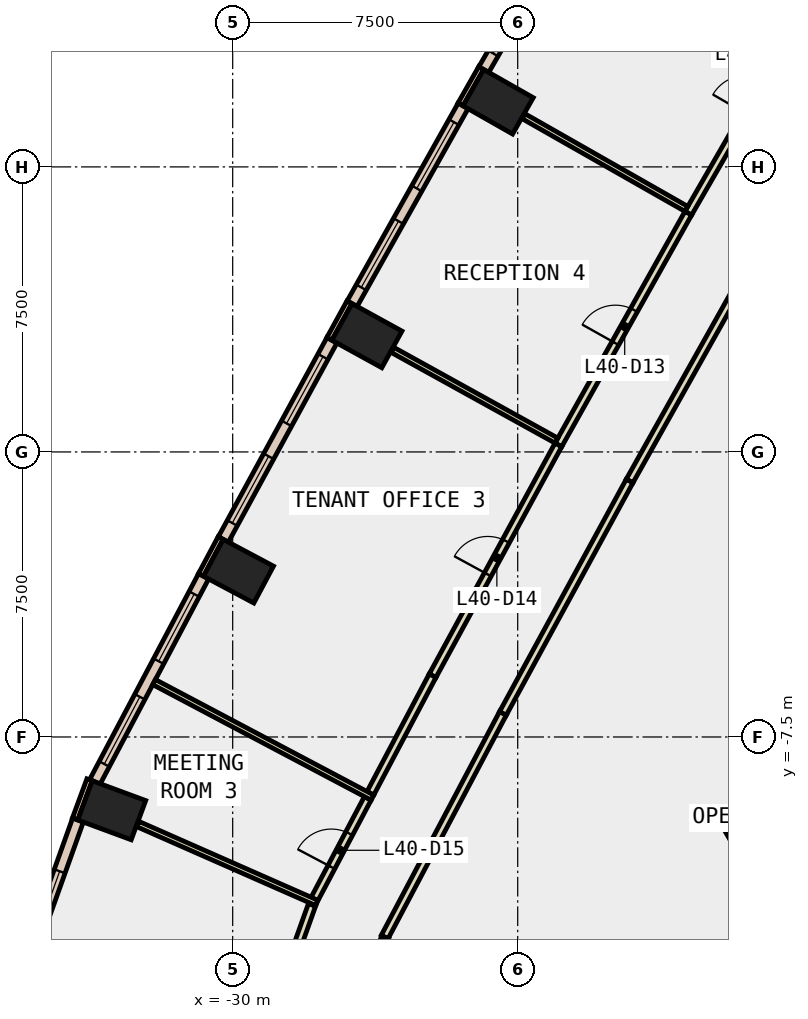
"""IFC4 building model, lengths in metres.
Left out: names, types, materials, properties, quantities, classifications, styles, units other than length and angle.
Written with IfcOpenShell. Run it as: python <this file> out.ifc"""

import sys

from ifc_helpers import new_model, si_unit, direction, frame, frame_2d, origin, origin_2d, place, context, subcontext, project, spatial, rectangle, extrude, element, fill, save


model = new_model("IFC4")
c1 = context("Model", 3, precision=1e-05, world=origin(), true_north=direction((0.0, 1.0)))
c2 = subcontext(c1, "Body", "Model", "MODEL_VIEW")
j1 = project(units=[si_unit("LENGTHUNIT", "METRE"), si_unit("PLANEANGLEUNIT", "RADIAN")], contexts=[c1])
p1 = place(None, origin())
s1 = spatial("IfcSite", under=j1, at=p1, CompositionType="ELEMENT")
p2 = place(p1, origin())
s2 = spatial("IfcBuilding", under=s1, at=p2, CompositionType="ELEMENT")
p3 = place(p2, frame((0.0, 0.0, 180.2)))
s3 = spatial("IfcBuildingStorey", under=s2, at=p3, CompositionType="ELEMENT", Elevation=180.2)
for number, where, z_axis, x_axis in (
    (1, (-23.015, 9.214, -0.4), (0.0, 0.0, 1.0), (0.494, 0.869, 0.0)),
    (2, (-26.468, 3.059, -0.4), (0.0, 0.0, 1.0), (0.482, 0.876, 0.0)),
    (3, (-29.847, -3.138, -0.4), (0.0, 0.0, 1.0), (0.47, 0.883, 0.0)),
    (4, (-33.183, -9.429, -0.4), (0.0, 0.0, 1.0), (0.347, 0.938, 0.0)),
):
    element("IfcColumn", number, at=place(p3, frame(where, z_axis=z_axis, x_axis=x_axis)), inside=s3, PredefinedType="COLUMN", context=c2, shape_type="SweptSolid", body=[
        extrude(rectangle(XDim=1.1, YDim=1.5, at=origin_2d()), origin(), (0.0, 0.0, 1.0), 4.0),
    ])
p4 = place(p3, frame((-9.31, -5.375, -0.4), z_axis=(0.0, 0.0, 1.0), x_axis=(-0.866017533419, -0.500013631625, 0.0)))
e5 = element("IfcWall", 5, at=p4, inside=s3, PredefinedType="SHEAR", context=c2, shape_type="SweptSolid", body=[
    extrude(rectangle(XDim=9.0, YDim=0.8, at=frame_2d((4.5, 0.0))), origin(), (0.0, 0.0, 1.0), 4.0),
])
p5 = place(p3, frame((-23.461, 10.1, 0.0), z_axis=(0.0, 0.0, 1.0), x_axis=(-0.494512685492, -0.869170411305, 0.0)))
e6 = element("IfcWall", 6, at=p5, inside=s3, PredefinedType="STANDARD", context=c2, shape_type="SweptSolid", body=[
    extrude(rectangle(XDim=1.1, YDim=0.15, at=frame_2d((0.55, 0.0))), origin(), (0.0, 0.0, 1.0), 3.6),
])
p6 = place(p3, frame((-26.926, 3.939, 0.0), z_axis=(0.0, 0.0, 1.0), x_axis=(-0.481850587491, -0.876253394478, 0.0)))
e7 = element("IfcWall", 7, at=p6, inside=s3, PredefinedType="STANDARD", context=c2, shape_type="SweptSolid", body=[
    extrude(rectangle(XDim=1.1, YDim=0.15, at=frame_2d((0.55, 0.0))), origin(), (0.0, 0.0, 1.0), 3.6),
])
p7 = place(p3, frame((-30.316, -2.265, 0.0), z_axis=(0.0, 0.0, 1.0), x_axis=(-0.469966207956, -0.882684407577, 0.0)))
e8 = element("IfcWall", 8, at=p7, inside=s3, PredefinedType="STANDARD", context=c2, shape_type="SweptSolid", body=[
    extrude(rectangle(XDim=1.1, YDim=0.15, at=frame_2d((0.55, 0.0))), origin(), (0.0, 0.0, 1.0), 3.6),
])
p8 = place(p3, frame((-33.766, -8.627, 0.0), z_axis=(0.0, 0.0, 1.0), x_axis=(-0.346229846278, -0.938149718087, 0.0)))
e9 = element("IfcWall", 9, at=p8, inside=s3, PredefinedType="STANDARD", context=c2, shape_type="SweptSolid", body=[
    extrude(rectangle(XDim=1.1, YDim=0.15, at=frame_2d((0.55, 0.0))), origin(), (0.0, 0.0, 1.0), 3.6),
])
p9 = place(p3, frame((-20.409, 15.23, 0.0), z_axis=(0.0, 0.0, 1.0), x_axis=(-0.499908916093, -0.866077984716, 0.0)))
e10 = element("IfcWall", 10, at=p9, inside=s3, PredefinedType="STANDARD", context=c2, shape_type="SweptSolid", body=[
    extrude(rectangle(XDim=5.969, YDim=0.3, at=frame_2d((2.985, 0.0))), origin(), (0.0, 0.0, 1.0), 3.6),
])
p10 = place(p9, frame((0.492, 0.0, 0.9)))
e11 = element("IfcOpeningElement", 11, at=p10, cuts=e10, PredefinedType="OPENING", context=c2, shape_type="SweptSolid", body=[
    extrude(rectangle(XDim=2.0, YDim=2.6, at=frame_2d((1.0, 1.3))), frame((0.0, 0.16, 0.0), z_axis=(0.0, -1.0, 0.0), x_axis=(1.0, 0.0, 0.0)), (0.0, 0.0, 1.0), 0.32),
])
p11 = place(p9, frame((3.477, 0.0, 0.9)))
e12 = element("IfcOpeningElement", 12, at=p11, cuts=e10, PredefinedType="OPENING", context=c2, shape_type="SweptSolid", body=[
    extrude(rectangle(XDim=2.0, YDim=2.6, at=frame_2d((1.0, 1.3))), frame((0.0, 0.16, 0.0), z_axis=(0.0, -1.0, 0.0), x_axis=(1.0, 0.0, 0.0)), (0.0, 0.0, 1.0), 0.32),
])
p12 = place(p3, frame((-23.936, 9.106, 0.0), z_axis=(0.0, 0.0, 1.0), x_axis=(-0.489305602904, -0.872112393541, 0.0)))
e13 = element("IfcWall", 13, at=p12, inside=s3, PredefinedType="STANDARD", context=c2, shape_type="SweptSolid", body=[
    extrude(rectangle(XDim=5.969, YDim=0.3, at=frame_2d((2.985, 0.0))), origin(), (0.0, 0.0, 1.0), 3.6),
])
p13 = place(p12, frame((0.492, 0.0, 0.9)))
e14 = element("IfcOpeningElement", 14, at=p13, cuts=e13, PredefinedType="OPENING", context=c2, shape_type="SweptSolid", body=[
    extrude(rectangle(XDim=2.0, YDim=2.6, at=frame_2d((1.0, 1.3))), frame((0.0, 0.16, 0.0), z_axis=(0.0, -1.0, 0.0), x_axis=(1.0, 0.0, 0.0)), (0.0, 0.0, 1.0), 0.32),
])
p14 = place(p12, frame((3.477, 0.0, 0.9)))
e15 = element("IfcOpeningElement", 15, at=p14, cuts=e13, PredefinedType="OPENING", context=c2, shape_type="SweptSolid", body=[
    extrude(rectangle(XDim=2.0, YDim=2.6, at=frame_2d((1.0, 1.3))), frame((0.0, 0.16, 0.0), z_axis=(0.0, -1.0, 0.0), x_axis=(1.0, 0.0, 0.0)), (0.0, 0.0, 1.0), 0.32),
])
p15 = place(p3, frame((-27.388, 2.939, 0.0), z_axis=(0.0, 0.0, 1.0), x_axis=(-0.478711740571, -0.877972134774, 0.0)))
e16 = element("IfcWall", 16, at=p15, inside=s3, PredefinedType="STANDARD", context=c2, shape_type="SweptSolid", body=[
    extrude(rectangle(XDim=5.97, YDim=0.3, at=frame_2d((2.985, 0.0))), origin(), (0.0, 0.0, 1.0), 3.6),
])
p16 = place(p15, frame((0.493, 0.0, 0.9)))
e17 = element("IfcOpeningElement", 17, at=p16, cuts=e16, PredefinedType="OPENING", context=c2, shape_type="SweptSolid", body=[
    extrude(rectangle(XDim=2.0, YDim=2.6, at=frame_2d((1.0, 1.3))), frame((0.0, 0.16, 0.0), z_axis=(0.0, -1.0, 0.0), x_axis=(1.0, 0.0, 0.0)), (0.0, 0.0, 1.0), 0.32),
])
p17 = place(p15, frame((3.478, 0.0, 0.9)))
e18 = element("IfcOpeningElement", 18, at=p17, cuts=e16, PredefinedType="OPENING", context=c2, shape_type="SweptSolid", body=[
    extrude(rectangle(XDim=2.0, YDim=2.6, at=frame_2d((1.0, 1.3))), frame((0.0, 0.16, 0.0), z_axis=(0.0, -1.0, 0.0), x_axis=(1.0, 0.0, 0.0)), (0.0, 0.0, 1.0), 0.32),
])
p18 = place(p3, frame((-30.765, -3.271, 0.0), z_axis=(0.0, 0.0, 1.0), x_axis=(-0.467572383403, -0.883954787463, 0.0)))
e19 = element("IfcWall", 19, at=p18, inside=s3, PredefinedType="STANDARD", context=c2, shape_type="SweptSolid", body=[
    extrude(rectangle(XDim=6.119, YDim=0.3, at=frame_2d((3.06, 0.0))), origin(), (0.0, 0.0, 1.0), 3.6),
])
p19 = place(p18, frame((0.53, 0.0, 0.9)))
e20 = element("IfcOpeningElement", 20, at=p19, cuts=e19, PredefinedType="OPENING", context=c2, shape_type="SweptSolid", body=[
    extrude(rectangle(XDim=2.0, YDim=2.6, at=frame_2d((1.0, 1.3))), frame((0.0, 0.16, 0.0), z_axis=(0.0, -1.0, 0.0), x_axis=(1.0, 0.0, 0.0)), (0.0, 0.0, 1.0), 0.32),
])
p20 = place(p18, frame((3.589, 0.0, 0.9)))
e21 = element("IfcOpeningElement", 21, at=p20, cuts=e19, PredefinedType="OPENING", context=c2, shape_type="SweptSolid", body=[
    extrude(rectangle(XDim=2.0, YDim=2.6, at=frame_2d((1.0, 1.3))), frame((0.0, 0.16, 0.0), z_axis=(0.0, -1.0, 0.0), x_axis=(1.0, 0.0, 0.0)), (0.0, 0.0, 1.0), 0.32),
])
p21 = place(p3, frame((-34.071, -9.686, 0.0), z_axis=(0.0, 0.0, 1.0), x_axis=(-0.336652028742, -0.941629126325, 0.0)))
e22 = element("IfcWall", 22, at=p21, inside=s3, PredefinedType="STANDARD", context=c2, shape_type="SweptSolid", body=[
    extrude(rectangle(XDim=4.263, YDim=0.3, at=frame_2d((2.131, 0.0))), origin(), (0.0, 0.0, 1.0), 3.6),
])
p22 = place(p21, frame((1.431, 0.0, 0.9)))
e23 = element("IfcOpeningElement", 23, at=p22, cuts=e22, PredefinedType="OPENING", context=c2, shape_type="SweptSolid", body=[
    extrude(rectangle(XDim=1.4, YDim=2.6, at=frame_2d((0.7, 1.3))), frame((0.0, 0.16, 0.0), z_axis=(0.0, -1.0, 0.0), x_axis=(1.0, 0.0, 0.0)), (0.0, 0.0, 1.0), 0.32),
])
p23 = place(p3, frame((-22.888, -6.878, 0.0), z_axis=(0.0, 0.0, 1.0), x_axis=(-0.467533790284, -0.883975200411, 0.0)))
e24 = element("IfcWall", 24, at=p23, inside=s3, PredefinedType="PARTITIONING", context=c2, shape_type="SweptSolid", body=[
    extrude(rectangle(XDim=6.656, YDim=0.2, at=frame_2d((3.328, 0.0))), origin(), (0.0, 0.0, 1.0), 3.6),
])
p24 = place(p3, frame((-25.987, -12.768, 0.0), z_axis=(0.0, 0.0, 1.0), x_axis=(-0.33645112914, -0.941700927949, 0.0)))
e25 = element("IfcWall", 25, at=p24, inside=s3, PredefinedType="PARTITIONING", context=c2, shape_type="SweptSolid", body=[
    extrude(rectangle(XDim=2.292, YDim=0.2, at=frame_2d((1.146, 0.0))), origin(), (0.0, 0.0, 1.0), 3.6),
])
p25 = place(p3, frame((-16.299, 5.04, 0.0), z_axis=(0.0, 0.0, 1.0), x_axis=(-0.489219677344, -0.872160597195, 0.0)))
e26 = element("IfcWall", 26, at=p25, inside=s3, PredefinedType="PARTITIONING", context=c2, shape_type="SweptSolid", body=[
    extrude(rectangle(XDim=6.657, YDim=0.2, at=frame_2d((3.329, 0.0))), origin(), (0.0, 0.0, 1.0), 3.6),
])
p26 = place(p3, frame((-19.556, -0.766, 0.0), z_axis=(0.0, 0.0, 1.0), x_axis=(-0.478665365973, -0.877997418799, 0.0)))
e27 = element("IfcWall", 27, at=p26, inside=s3, PredefinedType="PARTITIONING", context=c2, shape_type="SweptSolid", body=[
    extrude(rectangle(XDim=6.961, YDim=0.2, at=frame_2d((3.48, 0.0))), origin(), (0.0, 0.0, 1.0), 3.6),
])
p27 = place(p3, frame((-18.012, 6.28, 0.0), z_axis=(0.0, 0.0, 1.0), x_axis=(0.49995092924, 0.866053732947, 0.0)))
e28 = element("IfcWall", 28, at=p27, inside=s3, PredefinedType="PARTITIONING", context=c2, shape_type="SweptSolid", body=[
    extrude(rectangle(XDim=7.061, YDim=0.2, at=frame_2d((3.53, 0.0))), origin(), (0.0, 0.0, 1.0), 3.6),
])
p28 = place(p27, frame((3.03, 0.0, 0.0)))
e29 = element("IfcOpeningElement", 29, at=p28, cuts=e28, PredefinedType="OPENING", context=c2, shape_type="SweptSolid", body=[
    extrude(rectangle(XDim=1.0, YDim=2.1, at=frame_2d((0.5, 1.05))), frame((0.0, 0.11, 0.0), z_axis=(0.0, -1.0, 0.0), x_axis=(1.0, 0.0, 0.0)), (0.0, 0.0, 1.0), 0.22),
])
p29 = place(p3, frame((-21.43, 0.185, 0.0), z_axis=(0.0, 0.0, 1.0), x_axis=(0.489124577711, 0.872213934468, 0.0)))
e30 = element("IfcWall", 30, at=p29, inside=s3, PredefinedType="PARTITIONING", context=c2, shape_type="SweptSolid", body=[
    extrude(rectangle(XDim=6.988, YDim=0.2, at=frame_2d((3.494, 0.0))), origin(), (0.0, 0.0, 1.0), 3.6),
])
p30 = place(p29, frame((3.069, 0.0, 0.0)))
e31 = element("IfcOpeningElement", 31, at=p30, cuts=e30, PredefinedType="OPENING", context=c2, shape_type="SweptSolid", body=[
    extrude(rectangle(XDim=1.0, YDim=2.1, at=frame_2d((0.5, 1.05))), frame((0.0, 0.11, 0.0), z_axis=(0.0, -1.0, 0.0), x_axis=(1.0, 0.0, 0.0)), (0.0, 0.0, 1.0), 0.22),
])
p31 = place(p3, frame((-26.376, -8.982, 0.0), z_axis=(0.0, 0.0, 1.0), x_axis=(0.467529077139, 0.883977693174, 0.0)))
e32 = element("IfcWall", 32, at=p31, inside=s3, PredefinedType="PARTITIONING", context=c2, shape_type="SweptSolid", body=[
    extrude(rectangle(XDim=3.503, YDim=0.2, at=frame_2d((1.752, 0.0))), origin(), (0.0, 0.0, 1.0), 3.6),
])
p32 = place(p3, frame((-24.738, -5.885, 0.0), z_axis=(0.0, 0.0, 1.0), x_axis=(0.478535377863, 0.878068273048, 0.0)))
e33 = element("IfcWall", 33, at=p32, inside=s3, PredefinedType="PARTITIONING", context=c2, shape_type="SweptSolid", body=[
    extrude(rectangle(XDim=6.913, YDim=0.2, at=frame_2d((3.457, 0.0))), origin(), (0.0, 0.0, 1.0), 3.6),
])
p33 = place(p32, frame((3.031, 0.0, 0.0)))
e34 = element("IfcOpeningElement", 34, at=p33, cuts=e33, PredefinedType="OPENING", context=c2, shape_type="SweptSolid", body=[
    extrude(rectangle(XDim=1.0, YDim=2.1, at=frame_2d((0.5, 1.05))), frame((0.0, 0.11, 0.0), z_axis=(0.0, -1.0, 0.0), x_axis=(1.0, 0.0, 0.0)), (0.0, 0.0, 1.0), 0.22),
])
p34 = place(p3, frame((-27.891, -11.847, 0.0), z_axis=(0.0, 0.0, 1.0), x_axis=(0.467571923705, 0.883955030623, 0.0)))
e35 = element("IfcWall", 35, at=p34, inside=s3, PredefinedType="PARTITIONING", context=c2, shape_type="SweptSolid", body=[
    extrude(rectangle(XDim=3.091, YDim=0.2, at=frame_2d((1.545, 0.0))), origin(), (0.0, 0.0, 1.0), 3.6),
])
p35 = place(p34, frame((1.045, 0.0, 0.0)))
e36 = element("IfcOpeningElement", 36, at=p35, cuts=e35, PredefinedType="OPENING", context=c2, shape_type="SweptSolid", body=[
    extrude(rectangle(XDim=1.0, YDim=2.1, at=frame_2d((0.5, 1.05))), frame((0.0, 0.11, 0.0), z_axis=(0.0, -1.0, 0.0), x_axis=(1.0, 0.0, 0.0)), (0.0, 0.0, 1.0), 0.22),
])
p36 = place(p3, frame((-28.94, -14.789, 0.0), z_axis=(0.0, 0.0, 1.0), x_axis=(0.336864004528, 0.941553313654, 0.0)))
e37 = element("IfcWall", 37, at=p36, inside=s3, PredefinedType="PARTITIONING", context=c2, shape_type="SweptSolid", body=[
    extrude(rectangle(XDim=3.048, YDim=0.2, at=frame_2d((1.524, 0.0))), origin(), (0.0, 0.0, 1.0), 3.6),
])
p37 = place(p3, frame((-18.062, 6.395, 0.0), z_axis=(0.0, 0.0, 1.0), x_axis=(-0.869113540562, 0.494612629854, 0.0)))
e38 = element("IfcWall", 38, at=p37, inside=s3, PredefinedType="PARTITIONING", context=c2, shape_type="SweptSolid", body=[
    extrude(rectangle(XDim=4.929, YDim=0.15, at=frame_2d((2.465, 0.0))), origin(), (0.0, 0.0, 1.0), 3.6),
])
p38 = place(p3, frame((-21.481, 0.299, 0.0), z_axis=(0.0, 0.0, 1.0), x_axis=(-0.875073760972, 0.483989579286, 0.0)))
e39 = element("IfcWall", 39, at=p38, inside=s3, PredefinedType="PARTITIONING", context=c2, shape_type="SweptSolid", body=[
    extrude(rectangle(XDim=4.93, YDim=0.15, at=frame_2d((2.465, 0.0))), origin(), (0.0, 0.0, 1.0), 3.6),
])
p39 = place(p3, frame((-26.323, -9.095, 0.0), z_axis=(0.0, 0.0, 1.0), x_axis=(-0.883977869384, 0.467528743971, 0.0)))
e40 = element("IfcWall", 40, at=p39, inside=s3, PredefinedType="PARTITIONING", context=c2, shape_type="SweptSolid", body=[
    extrude(rectangle(XDim=6.5, YDim=0.15, at=frame_2d((3.25, 0.0))), origin(), (0.0, 0.0, 1.0), 3.6),
])
p40 = place(p3, frame((-27.788, -11.865, 0.0), z_axis=(0.0, 0.0, 1.0), x_axis=(-0.915139307711, 0.403137752489, 0.0)))
e41 = element("IfcWall", 41, at=p40, inside=s3, PredefinedType="PARTITIONING", context=c2, shape_type="SweptSolid", body=[
    extrude(rectangle(XDim=5.145, YDim=0.15, at=frame_2d((2.572, 0.0))), origin(), (0.0, 0.0, 1.0), 3.6),
])
p41 = place(p11, origin())
e42 = element("IfcWindow", 42, at=p41, inside=s3, PartitioningType="SINGLE_PANEL", PredefinedType="WINDOW", context=c2, shape_type="SweptSolid", body=[
    extrude(rectangle(XDim=2.0, YDim=2.6, at=frame_2d((1.0, 1.3))), frame((0.0, 0.03, 0.0), z_axis=(0.0, -1.0, 0.0), x_axis=(1.0, 0.0, 0.0)), (0.0, 0.0, 1.0), 0.06),
])
fill(e12, e42)
p42 = place(p13, origin())
e43 = element("IfcWindow", 43, at=p42, inside=s3, PartitioningType="SINGLE_PANEL", PredefinedType="WINDOW", context=c2, shape_type="SweptSolid", body=[
    extrude(rectangle(XDim=2.0, YDim=2.6, at=frame_2d((1.0, 1.3))), frame((0.0, 0.03, 0.0), z_axis=(0.0, -1.0, 0.0), x_axis=(1.0, 0.0, 0.0)), (0.0, 0.0, 1.0), 0.06),
])
fill(e14, e43)
p43 = place(p14, origin())
e44 = element("IfcWindow", 44, at=p43, inside=s3, PartitioningType="SINGLE_PANEL", PredefinedType="WINDOW", context=c2, shape_type="SweptSolid", body=[
    extrude(rectangle(XDim=2.0, YDim=2.6, at=frame_2d((1.0, 1.3))), frame((0.0, 0.03, 0.0), z_axis=(0.0, -1.0, 0.0), x_axis=(1.0, 0.0, 0.0)), (0.0, 0.0, 1.0), 0.06),
])
fill(e15, e44)
p44 = place(p16, origin())
e45 = element("IfcWindow", 45, at=p44, inside=s3, PartitioningType="SINGLE_PANEL", PredefinedType="WINDOW", context=c2, shape_type="SweptSolid", body=[
    extrude(rectangle(XDim=2.0, YDim=2.6, at=frame_2d((1.0, 1.3))), frame((0.0, 0.03, 0.0), z_axis=(0.0, -1.0, 0.0), x_axis=(1.0, 0.0, 0.0)), (0.0, 0.0, 1.0), 0.06),
])
fill(e17, e45)
p45 = place(p17, origin())
e46 = element("IfcWindow", 46, at=p45, inside=s3, PartitioningType="SINGLE_PANEL", PredefinedType="WINDOW", context=c2, shape_type="SweptSolid", body=[
    extrude(rectangle(XDim=2.0, YDim=2.6, at=frame_2d((1.0, 1.3))), frame((0.0, 0.03, 0.0), z_axis=(0.0, -1.0, 0.0), x_axis=(1.0, 0.0, 0.0)), (0.0, 0.0, 1.0), 0.06),
])
fill(e18, e46)
p46 = place(p19, origin())
e47 = element("IfcWindow", 47, at=p46, inside=s3, PartitioningType="SINGLE_PANEL", PredefinedType="WINDOW", context=c2, shape_type="SweptSolid", body=[
    extrude(rectangle(XDim=2.0, YDim=2.6, at=frame_2d((1.0, 1.3))), frame((0.0, 0.03, 0.0), z_axis=(0.0, -1.0, 0.0), x_axis=(1.0, 0.0, 0.0)), (0.0, 0.0, 1.0), 0.06),
])
fill(e20, e47)
p47 = place(p20, origin())
e48 = element("IfcWindow", 48, at=p47, inside=s3, PartitioningType="SINGLE_PANEL", PredefinedType="WINDOW", context=c2, shape_type="SweptSolid", body=[
    extrude(rectangle(XDim=2.0, YDim=2.6, at=frame_2d((1.0, 1.3))), frame((0.0, 0.03, 0.0), z_axis=(0.0, -1.0, 0.0), x_axis=(1.0, 0.0, 0.0)), (0.0, 0.0, 1.0), 0.06),
])
fill(e21, e48)
p48 = place(p22, origin())
e49 = element("IfcWindow", 49, at=p48, inside=s3, PartitioningType="SINGLE_PANEL", PredefinedType="WINDOW", context=c2, shape_type="SweptSolid", body=[
    extrude(rectangle(XDim=1.4, YDim=2.6, at=frame_2d((0.7, 1.3))), frame((0.0, 0.03, 0.0), z_axis=(0.0, -1.0, 0.0), x_axis=(1.0, 0.0, 0.0)), (0.0, 0.0, 1.0), 0.06),
])
fill(e23, e49)
p49 = place(p30, origin())
e50 = element("IfcDoor", 50, at=p49, inside=s3, OperationType="SINGLE_SWING_LEFT", PredefinedType="DOOR", context=c2, shape_type="SweptSolid", body=[
    extrude(rectangle(XDim=1.0, YDim=2.1, at=frame_2d((0.5, 1.05))), frame((0.0, 0.025, 0.0), z_axis=(0.0, -1.0, 0.0), x_axis=(1.0, 0.0, 0.0)), (0.0, 0.0, 1.0), 0.05),
])
fill(e31, e50)
p50 = place(p33, origin())
e51 = element("IfcDoor", 51, at=p50, inside=s3, OperationType="SINGLE_SWING_RIGHT", PredefinedType="DOOR", context=c2, shape_type="SweptSolid", body=[
    extrude(rectangle(XDim=1.0, YDim=2.1, at=frame_2d((0.5, 1.05))), frame((0.0, 0.025, 0.0), z_axis=(0.0, -1.0, 0.0), x_axis=(1.0, 0.0, 0.0)), (0.0, 0.0, 1.0), 0.05),
])
fill(e34, e51)
p51 = place(p35, origin())
e52 = element("IfcDoor", 52, at=p51, inside=s3, OperationType="SINGLE_SWING_LEFT", PredefinedType="DOOR", context=c2, shape_type="SweptSolid", body=[
    extrude(rectangle(XDim=1.0, YDim=2.1, at=frame_2d((0.5, 1.05))), frame((0.0, 0.025, 0.0), z_axis=(0.0, -1.0, 0.0), x_axis=(1.0, 0.0, 0.0)), (0.0, 0.0, 1.0), 0.05),
])
fill(e36, e52)
save(model, sys.argv[1])
